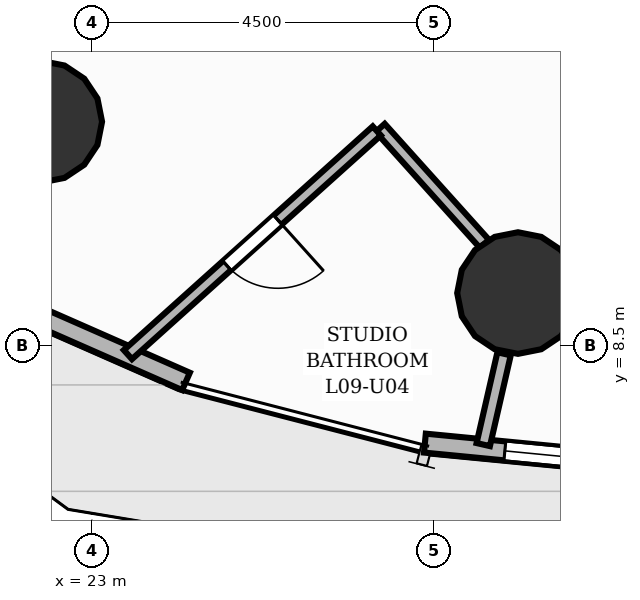
"""IFC4 building model, lengths in metres.
Left out: names, types, materials, properties, quantities, classifications, styles, units other than length and angle.
Written with IfcOpenShell. Run it as: python <this file> out.ifc"""

import sys

from ifc_helpers import new_model, si_unit, direction, frame, frame_2d, origin, origin_2d, place, context, subcontext, project, spatial, rectangle, circle, extrude, element, fill, save


model = new_model("IFC4")
c1 = context("Model", 3, precision=1e-05, world=origin(), true_north=direction((0.0, 1.0)))
c2 = subcontext(c1, "Body", "Model", "MODEL_VIEW")
j1 = project(units=[si_unit("LENGTHUNIT", "METRE"), si_unit("PLANEANGLEUNIT", "RADIAN")], contexts=[c1])
p1 = place(None, origin())
s1 = spatial("IfcSite", under=j1, at=p1, CompositionType="ELEMENT")
p2 = place(p1, origin())
s2 = spatial("IfcBuilding", under=s1, at=p2, CompositionType="ELEMENT")
p3 = place(p2, frame((0.0, 0.0, 34.4)))
s3 = spatial("IfcBuildingStorey", under=s2, at=p3, CompositionType="ELEMENT", Elevation=34.4)
for number, where, z_axis, x_axis in (
    (1, (22.333, 11.445, 0.0), (0.0, 0.0, 1.0), (1.0, 0.0, 0.0)),
    (2, (28.605, 9.19, 0.0), (0.0, 0.0, 1.0), (1.0, 0.0, 0.0)),
):
    element("IfcColumn", number, at=place(p3, frame(where, z_axis=z_axis, x_axis=x_axis)), inside=s3, PredefinedType="COLUMN", context=c2, shape_type="SweptSolid", body=[
        extrude(circle(Radius=0.8, at=origin_2d()), origin(), (0.0, 0.0, 1.0), 3.2),
    ])
p4 = place(p3, frame((24.237, 8.028, 0.0), z_axis=(0.0, 0.0, 1.0), x_axis=(-0.915312914138, 0.402743428515, 0.0)))
e3 = element("IfcWall", 3, at=p4, inside=s3, PredefinedType="SOLIDWALL", context=c2, shape_type="SweptSolid", body=[
    extrude(rectangle(XDim=3.399, YDim=0.25, at=frame_2d((1.699, 0.0))), origin(), (0.0, 0.0, 1.0), 2.96),
])
p5 = place(p3, frame((30.877, 6.876, 0.0), z_axis=(0.0, 0.0, 1.0), x_axis=(-0.995323323337, 0.096599596386, 0.0)))
e4 = element("IfcWall", 4, at=p5, inside=s3, PredefinedType="SOLIDWALL", context=c2, shape_type="SweptSolid", body=[
    extrude(rectangle(XDim=3.513, YDim=0.25, at=frame_2d((1.756, 0.0))), origin(), (0.0, 0.0, 1.0), 2.96),
])
p6 = place(p5, frame((1.056, 0.0, 0.85)))
e5 = element("IfcOpeningElement", 5, at=p6, cuts=e4, PredefinedType="OPENING", context=c2, shape_type="SweptSolid", body=[
    extrude(rectangle(XDim=1.4, YDim=1.29, at=frame_2d((0.7, 0.645))), frame((0.0, 0.135, 0.0), z_axis=(0.0, -1.0, 0.0), x_axis=(1.0, 0.0, 0.0)), (0.0, 0.0, 1.0), 0.27),
])
p7 = place(p3, frame((28.422, 8.391, 0.0), z_axis=(0.0, 0.0, 1.0), x_axis=(-0.223317008343, -0.974745871386, 0.0)))
e6 = element("IfcWall", 6, at=p7, inside=s3, PredefinedType="PARTITIONING", context=c2, shape_type="SweptSolid", body=[
    extrude(rectangle(XDim=1.226, YDim=0.18, at=frame_2d((0.613, 0.0))), origin(), (0.0, 0.0, 1.0), 2.178),
])
p8 = place(p3, frame((28.164, 9.837, 0.0), z_axis=(0.0, 0.0, 1.0), x_axis=(-0.668451915184, 0.743755361048, 0.0)))
e7 = element("IfcWall", 7, at=p8, inside=s3, PredefinedType="PLUMBINGWALL", context=c2, shape_type="SweptSolid", body=[
    extrude(rectangle(XDim=2.052, YDim=0.16, at=frame_2d((1.026, 0.0))), origin(), (0.0, 0.0, 1.0), 2.955),
])
p9 = place(p3, frame((26.748, 11.324, 0.0), z_axis=(0.0, 0.0, 1.0), x_axis=(-0.743726854299, -0.668483631957, 0.0)))
e8 = element("IfcWall", 8, at=p9, inside=s3, PredefinedType="PLUMBINGWALL", context=c2, shape_type="SweptSolid", body=[
    extrude(rectangle(XDim=4.403, YDim=0.16, at=frame_2d((2.202, 0.0))), origin(), (0.0, 0.0, 1.0), 2.955),
])
p10 = place(p9, frame((1.751, 0.0, 0.0)))
e9 = element("IfcOpeningElement", 9, at=p10, cuts=e8, PredefinedType="OPENING", context=c2, shape_type="SweptSolid", body=[
    extrude(rectangle(XDim=0.9, YDim=2.1, at=frame_2d((0.45, 1.05))), frame((0.0, 0.09, 0.0), z_axis=(0.0, -1.0, 0.0), x_axis=(1.0, 0.0, 0.0)), (0.0, 0.0, 1.0), 0.18),
])
p11 = place(p6, origin())
e10 = element("IfcWindow", 10, at=p11, inside=s3, PartitioningType="SINGLE_PANEL", PredefinedType="WINDOW", context=c2, shape_type="SweptSolid", body=[
    extrude(rectangle(XDim=1.4, YDim=1.29, at=frame_2d((0.7, 0.645))), frame((0.0, 0.03, 0.0), z_axis=(0.0, -1.0, 0.0), x_axis=(1.0, 0.0, 0.0)), (0.0, 0.0, 1.0), 0.06),
])
fill(e5, e10)
p12 = place(p10, origin())
e11 = element("IfcDoor", 11, at=p12, inside=s3, OperationType="SINGLE_SWING_LEFT", PredefinedType="DOOR", context=c2, shape_type="SweptSolid", body=[
    extrude(rectangle(XDim=0.9, YDim=2.1, at=frame_2d((0.45, 1.05))), frame((0.0, 0.025, 0.0), z_axis=(0.0, -1.0, 0.0), x_axis=(1.0, 0.0, 0.0)), (0.0, 0.0, 1.0), 0.05),
])
fill(e9, e11)
save(model, sys.argv[1])
